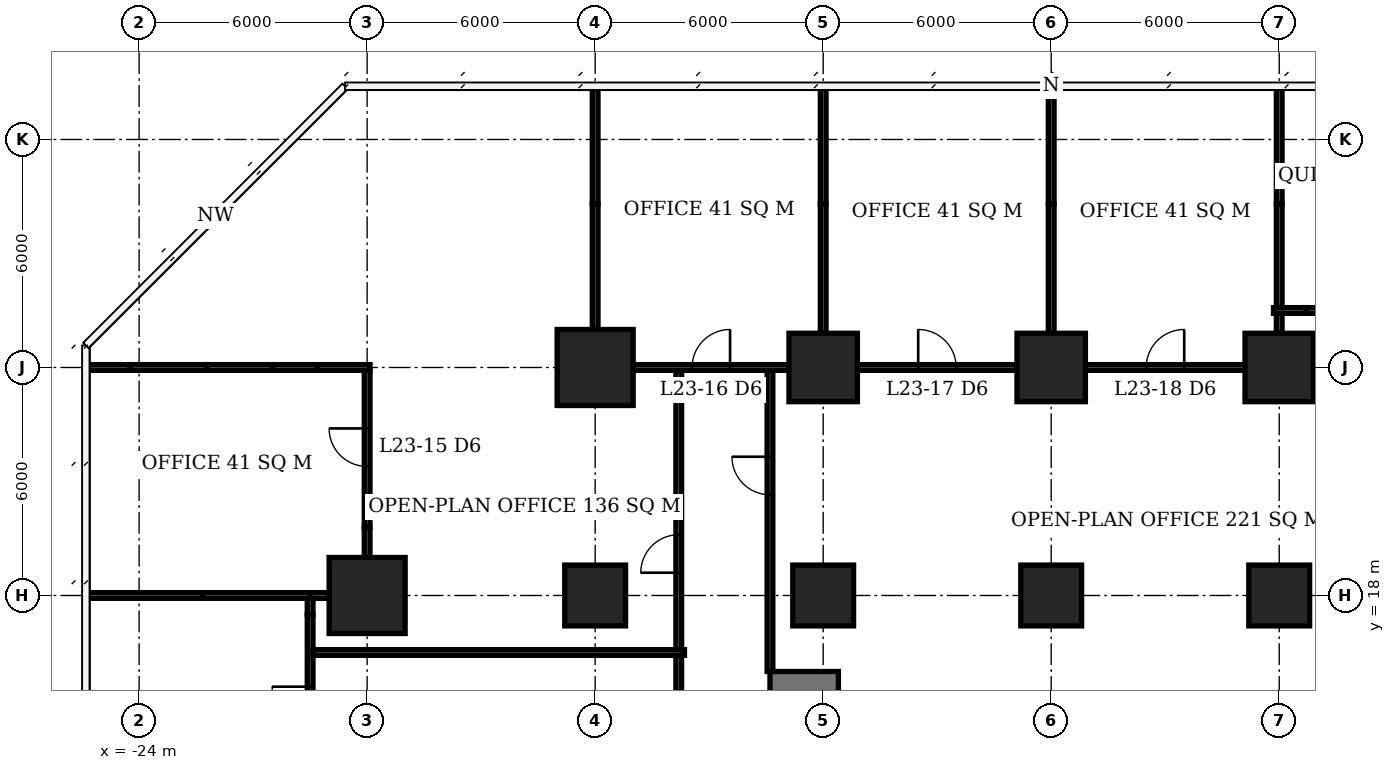
"""IFC4 building model, lengths in metres.
Left out: names, types, materials, properties, quantities, classifications, styles, units other than length and angle.
Written with IfcOpenShell. Run it as: python <this file> out.ifc"""

import sys

from ifc_helpers import new_model, si_unit, direction, frame, frame_2d, origin, origin_2d, place, context, subcontext, project, spatial, rectangle, extrude, element, fill, save


model = new_model("IFC4")
c1 = context("Model", 3, precision=1e-05, world=origin(), true_north=direction((0.0, 1.0)))
c2 = subcontext(c1, "Body", "Model", "MODEL_VIEW")
j1 = project(units=[si_unit("LENGTHUNIT", "METRE"), si_unit("PLANEANGLEUNIT", "RADIAN")], contexts=[c1])
p1 = place(None, origin())
s1 = spatial("IfcSite", under=j1, at=p1, CompositionType="ELEMENT")
p2 = place(p1, origin())
s2 = spatial("IfcBuilding", under=s1, at=p2, CompositionType="ELEMENT")
p3 = place(p2, frame((0.0, 0.0, 97.7)))
s3 = spatial("IfcBuildingStorey", under=s2, at=p3, CompositionType="ELEMENT", Elevation=97.7)
p4 = place(p3, frame((-18.0, 18.0, 0.0), z_axis=(0.0, 0.0, 1.0), x_axis=(1.0, 0.0, 0.0)))
e1 = element("IfcColumn", 1, at=p4, inside=s3, PredefinedType="COLUMN", context=c2, shape_type="SweptSolid", body=[
    extrude(rectangle(XDim=2.0, YDim=2.0, at=origin_2d()), origin(), (0.0, 0.0, 1.0), 3.9),
])
p5 = place(p3, frame((-12.0, 18.0, 0.0), z_axis=(0.0, 0.0, 1.0), x_axis=(1.0, 0.0, 0.0)))
e2 = element("IfcColumn", 2, at=p5, inside=s3, PredefinedType="COLUMN", context=c2, shape_type="SweptSolid", body=[
    extrude(rectangle(XDim=1.6, YDim=1.6, at=origin_2d()), origin(), (0.0, 0.0, 1.0), 3.9),
])
p6 = place(p3, frame((-12.0, 24.0, 0.0), z_axis=(0.0, 0.0, 1.0), x_axis=(1.0, 0.0, 0.0)))
e3 = element("IfcColumn", 3, at=p6, inside=s3, PredefinedType="COLUMN", context=c2, shape_type="SweptSolid", body=[
    extrude(rectangle(XDim=2.0, YDim=2.0, at=origin_2d()), origin(), (0.0, 0.0, 1.0), 3.9),
])
p7 = place(p3, frame((-6.0, 18.0, 0.0), z_axis=(0.0, 0.0, 1.0), x_axis=(1.0, 0.0, 0.0)))
e4 = element("IfcColumn", 4, at=p7, inside=s3, PredefinedType="COLUMN", context=c2, shape_type="SweptSolid", body=[
    extrude(rectangle(XDim=1.6, YDim=1.6, at=origin_2d()), origin(), (0.0, 0.0, 1.0), 3.9),
])
p8 = place(p3, frame((-6.0, 24.0, 0.0), z_axis=(0.0, 0.0, 1.0), x_axis=(1.0, 0.0, 0.0)))
e5 = element("IfcColumn", 5, at=p8, inside=s3, PredefinedType="COLUMN", context=c2, shape_type="SweptSolid", body=[
    extrude(rectangle(XDim=1.8, YDim=1.8, at=origin_2d()), origin(), (0.0, 0.0, 1.0), 3.9),
])
p9 = place(p3, frame((0.0, 18.0, 0.0), z_axis=(0.0, 0.0, 1.0), x_axis=(1.0, 0.0, 0.0)))
e6 = element("IfcColumn", 6, at=p9, inside=s3, PredefinedType="COLUMN", context=c2, shape_type="SweptSolid", body=[
    extrude(rectangle(XDim=1.6, YDim=1.6, at=origin_2d()), origin(), (0.0, 0.0, 1.0), 3.9),
])
p10 = place(p3, frame((0.0, 24.0, 0.0), z_axis=(0.0, 0.0, 1.0), x_axis=(1.0, 0.0, 0.0)))
e7 = element("IfcColumn", 7, at=p10, inside=s3, PredefinedType="COLUMN", context=c2, shape_type="SweptSolid", body=[
    extrude(rectangle(XDim=1.8, YDim=1.8, at=origin_2d()), origin(), (0.0, 0.0, 1.0), 3.9),
])
p11 = place(p3, frame((6.0, 18.0, 0.0), z_axis=(0.0, 0.0, 1.0), x_axis=(1.0, 0.0, 0.0)))
e8 = element("IfcColumn", 8, at=p11, inside=s3, PredefinedType="COLUMN", context=c2, shape_type="SweptSolid", body=[
    extrude(rectangle(XDim=1.6, YDim=1.6, at=origin_2d()), origin(), (0.0, 0.0, 1.0), 3.9),
])
p12 = place(p3, frame((6.0, 24.0, 0.0), z_axis=(0.0, 0.0, 1.0), x_axis=(1.0, 0.0, 0.0)))
e9 = element("IfcColumn", 9, at=p12, inside=s3, PredefinedType="COLUMN", context=c2, shape_type="SweptSolid", body=[
    extrude(rectangle(XDim=1.8, YDim=1.8, at=origin_2d()), origin(), (0.0, 0.0, 1.0), 3.9),
])
p13 = place(p3, frame((-6.5, 13.6, 0.0), z_axis=(0.0, 0.0, 1.0), x_axis=(0.0, 1.0, 0.0)))
e10 = element("IfcWall", 10, at=p13, inside=s3, PredefinedType="SHEAR", context=c2, shape_type="SweptSolid", body=[
    extrude(rectangle(XDim=2.4, YDim=1.8, at=frame_2d((1.2, 0.0))), origin(), (0.0, 0.0, 1.0), 3.9),
])
p14 = place(p3, frame((-25.4, 18.0, 0.0), z_axis=(0.0, 0.0, 1.0), x_axis=(1.0, 0.0, 0.0)))
e11 = element("IfcWall", 11, at=p14, inside=s3, PredefinedType="PARTITIONING", context=c2, shape_type="SweptSolid", body=[
    extrude(rectangle(XDim=3.09, YDim=0.15, at=frame_2d((1.545, 0.0))), origin(), (0.0, 0.0, 1.0), 3.65),
])
p15 = place(p3, frame((-22.31, 18.0, 0.0), z_axis=(0.0, 0.0, 1.0), x_axis=(1.0, 0.0, 0.0)))
e12 = element("IfcWall", 12, at=p15, inside=s3, PredefinedType="PARTITIONING", context=c2, shape_type="SweptSolid", body=[
    extrude(rectangle(XDim=2.885, YDim=0.15, at=frame_2d((1.442, 0.0))), origin(), (0.0, 0.0, 1.0), 2.65),
])
p16 = place(p3, frame((-19.5, 18.0, 0.0), z_axis=(0.0, 0.0, 1.0), x_axis=(1.0, 0.0, 0.0)))
e13 = element("IfcWall", 13, at=p16, inside=s3, PredefinedType="PARTITIONING", context=c2, shape_type="SweptSolid", body=[
    extrude(rectangle(XDim=0.5, YDim=0.15, at=frame_2d((0.25, 0.0))), origin(), (0.0, 0.0, 1.0), 2.65),
])
p17 = place(p3, frame((-25.4, 24.0, 0.0), z_axis=(0.0, 0.0, 1.0), x_axis=(1.0, 0.0, 0.0)))
e14 = element("IfcWall", 14, at=p17, inside=s3, PredefinedType="PARTITIONING", context=c2, shape_type="SweptSolid", body=[
    extrude(rectangle(XDim=1.163, YDim=0.15, at=frame_2d((0.582, 0.0))), origin(), (0.0, 0.0, 1.0), 3.65),
])
p18 = place(p3, frame((-24.237, 24.0, 0.0), z_axis=(0.0, 0.0, 1.0), x_axis=(1.0, 0.0, 0.0)))
e15 = element("IfcWall", 15, at=p18, inside=s3, PredefinedType="PARTITIONING", context=c2, shape_type="SweptSolid", body=[
    extrude(rectangle(XDim=2.029, YDim=0.15, at=frame_2d((1.015, 0.0))), origin(), (0.0, 0.0, 1.0), 2.65),
])
p19 = place(p3, frame((-22.208, 24.0, 0.0), z_axis=(0.0, 0.0, 1.0), x_axis=(1.0, 0.0, 0.0)))
e16 = element("IfcWall", 16, at=p19, inside=s3, PredefinedType="PARTITIONING", context=c2, shape_type="SweptSolid", body=[
    extrude(rectangle(XDim=1.718, YDim=0.15, at=frame_2d((0.859, 0.0))), origin(), (0.0, 0.0, 1.0), 3.65),
])
p20 = place(p3, frame((-20.49, 24.0, 0.0), z_axis=(0.0, 0.0, 1.0), x_axis=(1.0, 0.0, 0.0)))
e17 = element("IfcWall", 17, at=p20, inside=s3, PredefinedType="PARTITIONING", context=c2, shape_type="SweptSolid", body=[
    extrude(rectangle(XDim=1.18, YDim=0.15, at=frame_2d((0.59, 0.0))), origin(), (0.0, 0.0, 1.0), 2.65),
])
p21 = place(p3, frame((-19.31, 24.0, 0.0), z_axis=(0.0, 0.0, 1.0), x_axis=(1.0, 0.0, 0.0)))
e18 = element("IfcWall", 18, at=p21, inside=s3, PredefinedType="PARTITIONING", context=c2, shape_type="SweptSolid", body=[
    extrude(rectangle(XDim=1.385, YDim=0.15, at=frame_2d((0.692, 0.0))), origin(), (0.0, 0.0, 1.0), 3.65),
])
p22 = place(p3, frame((-11.0, 24.0, 0.0), z_axis=(0.0, 0.0, 1.0), x_axis=(1.0, 0.0, 0.0)))
e19 = element("IfcWall", 19, at=p22, inside=s3, PredefinedType="PARTITIONING", context=c2, shape_type="SweptSolid", body=[
    extrude(rectangle(XDim=4.1, YDim=0.15, at=frame_2d((2.05, 0.0))), origin(), (0.0, 0.0, 1.0), 3.65),
])
p23 = place(p22, frame((1.55, 0.0, 0.0)))
e20 = element("IfcOpeningElement", 20, at=p23, cuts=e19, PredefinedType="OPENING", context=c2, shape_type="SweptSolid", body=[
    extrude(rectangle(XDim=1.0, YDim=2.1, at=frame_2d((0.5, 1.05))), frame((0.0, 0.085, 0.0), z_axis=(0.0, -1.0, 0.0), x_axis=(1.0, 0.0, 0.0)), (0.0, 0.0, 1.0), 0.17),
])
p24 = place(p3, frame((-5.1, 24.0, 0.0), z_axis=(0.0, 0.0, 1.0), x_axis=(1.0, 0.0, 0.0)))
e21 = element("IfcWall", 21, at=p24, inside=s3, PredefinedType="PARTITIONING", context=c2, shape_type="SweptSolid", body=[
    extrude(rectangle(XDim=4.2, YDim=0.15, at=frame_2d((2.1, 0.0))), origin(), (0.0, 0.0, 1.0), 3.65),
])
p25 = place(p24, frame((1.6, 0.0, 0.0)))
e22 = element("IfcOpeningElement", 22, at=p25, cuts=e21, PredefinedType="OPENING", context=c2, shape_type="SweptSolid", body=[
    extrude(rectangle(XDim=1.0, YDim=2.1, at=frame_2d((0.5, 1.05))), frame((0.0, 0.085, 0.0), z_axis=(0.0, -1.0, 0.0), x_axis=(1.0, 0.0, 0.0)), (0.0, 0.0, 1.0), 0.17),
])
p26 = place(p3, frame((0.9, 24.0, 0.0), z_axis=(0.0, 0.0, 1.0), x_axis=(1.0, 0.0, 0.0)))
e23 = element("IfcWall", 23, at=p26, inside=s3, PredefinedType="PARTITIONING", context=c2, shape_type="SweptSolid", body=[
    extrude(rectangle(XDim=4.2, YDim=0.15, at=frame_2d((2.1, 0.0))), origin(), (0.0, 0.0, 1.0), 3.65),
])
p27 = place(p26, frame((1.6, 0.0, 0.0)))
e24 = element("IfcOpeningElement", 24, at=p27, cuts=e23, PredefinedType="OPENING", context=c2, shape_type="SweptSolid", body=[
    extrude(rectangle(XDim=1.0, YDim=2.1, at=frame_2d((0.5, 1.05))), frame((0.0, 0.085, 0.0), z_axis=(0.0, -1.0, 0.0), x_axis=(1.0, 0.0, 0.0)), (0.0, 0.0, 1.0), 0.17),
])
p28 = place(p3, frame((5.85, 25.5, 0.0), z_axis=(0.0, 0.0, 1.0), x_axis=(1.0, 0.0, 0.0)))
e25 = element("IfcWall", 25, at=p28, inside=s3, PredefinedType="PARTITIONING", context=c2, shape_type="SweptSolid", body=[
    extrude(rectangle(XDim=0.86, YDim=0.15, at=frame_2d((0.43, 0.0))), origin(), (0.0, 0.0, 1.0), 2.65),
])
p29 = place(p3, frame((6.71, 25.5, 0.0), z_axis=(0.0, 0.0, 1.0), x_axis=(1.0, 0.0, 0.0)))
e26 = element("IfcWall", 26, at=p29, inside=s3, PredefinedType="PARTITIONING", context=c2, shape_type="SweptSolid", body=[
    extrude(rectangle(XDim=4.58, YDim=0.15, at=frame_2d((2.29, 0.0))), origin(), (0.0, 0.0, 1.0), 3.65),
])
p30 = place(p29, frame((1.79, 0.0, 0.0)))
e27 = element("IfcOpeningElement", 27, at=p30, cuts=e26, PredefinedType="OPENING", context=c2, shape_type="SweptSolid", body=[
    extrude(rectangle(XDim=1.0, YDim=2.1, at=frame_2d((0.5, 1.05))), frame((0.0, 0.085, 0.0), z_axis=(0.0, -1.0, 0.0), x_axis=(1.0, 0.0, 0.0)), (0.0, 0.0, 1.0), 0.17),
])
p31 = place(p3, frame((-19.5, 12.71, 0.0), z_axis=(0.0, 0.0, 1.0), x_axis=(0.0, 1.0, 0.0)))
e28 = element("IfcWall", 28, at=p31, inside=s3, PredefinedType="PARTITIONING", context=c2, shape_type="SweptSolid", body=[
    extrude(rectangle(XDim=4.78, YDim=0.15, at=frame_2d((2.39, 0.0))), origin(), (0.0, 0.0, 1.0), 3.65),
])
p32 = place(p31, frame((1.89, 0.0, 0.0)))
e29 = element("IfcOpeningElement", 29, at=p32, cuts=e28, PredefinedType="OPENING", context=c2, shape_type="SweptSolid", body=[
    extrude(rectangle(XDim=1.0, YDim=2.1, at=frame_2d((0.5, 1.05))), frame((0.0, 0.085, 0.0), z_axis=(0.0, -1.0, 0.0), x_axis=(1.0, 0.0, 0.0)), (0.0, 0.0, 1.0), 0.17),
])
p33 = place(p3, frame((-19.5, 17.49, 0.0), z_axis=(0.0, 0.0, 1.0), x_axis=(0.0, 1.0, 0.0)))
e30 = element("IfcWall", 30, at=p33, inside=s3, PredefinedType="PARTITIONING", context=c2, shape_type="SweptSolid", body=[
    extrude(rectangle(XDim=0.435, YDim=0.15, at=frame_2d((0.218, 0.0))), origin(), (0.0, 0.0, 1.0), 2.65),
])
p34 = place(p3, frame((-18.0, 19.0, 0.0), z_axis=(0.0, 0.0, 1.0), x_axis=(0.0, 1.0, 0.0)))
e31 = element("IfcWall", 31, at=p34, inside=s3, PredefinedType="PARTITIONING", context=c2, shape_type="SweptSolid", body=[
    extrude(rectangle(XDim=0.792, YDim=0.15, at=frame_2d((0.396, 0.0))), origin(), (0.0, 0.0, 1.0), 2.65),
])
p35 = place(p3, frame((-18.0, 19.792, 0.0), z_axis=(0.0, 0.0, 1.0), x_axis=(0.0, 1.0, 0.0)))
e32 = element("IfcWall", 32, at=p35, inside=s3, PredefinedType="PARTITIONING", context=c2, shape_type="SweptSolid", body=[
    extrude(rectangle(XDim=4.133, YDim=0.15, at=frame_2d((2.066, 0.0))), origin(), (0.0, 0.0, 1.0), 3.65),
])
p36 = place(p35, frame((1.604, 0.0, 0.0)))
e33 = element("IfcOpeningElement", 33, at=p36, cuts=e32, PredefinedType="OPENING", context=c2, shape_type="SweptSolid", body=[
    extrude(rectangle(XDim=1.0, YDim=2.1, at=frame_2d((0.5, 1.05))), frame((0.0, 0.085, 0.0), z_axis=(0.0, -1.0, 0.0), x_axis=(1.0, 0.0, 0.0)), (0.0, 0.0, 1.0), 0.17),
])
p37 = place(p3, frame((-12.0, 25.0, 0.0), z_axis=(0.0, 0.0, 1.0), x_axis=(0.0, 1.0, 0.0)))
e34 = element("IfcWall", 34, at=p37, inside=s3, PredefinedType="PARTITIONING", context=c2, shape_type="SweptSolid", body=[
    extrude(rectangle(XDim=3.31, YDim=0.15, at=frame_2d((1.655, 0.0))), origin(), (0.0, 0.0, 1.0), 2.65),
])
p38 = place(p3, frame((-12.0, 28.31, 0.0), z_axis=(0.0, 0.0, 1.0), x_axis=(0.0, 1.0, 0.0)))
e35 = element("IfcWall", 35, at=p38, inside=s3, PredefinedType="PARTITIONING", context=c2, shape_type="SweptSolid", body=[
    extrude(rectangle(XDim=3.09, YDim=0.15, at=frame_2d((1.545, 0.0))), origin(), (0.0, 0.0, 1.0), 3.65),
])
p39 = place(p3, frame((-6.0, 24.9, 0.0), z_axis=(0.0, 0.0, 1.0), x_axis=(0.0, 1.0, 0.0)))
e36 = element("IfcWall", 36, at=p39, inside=s3, PredefinedType="PARTITIONING", context=c2, shape_type="SweptSolid", body=[
    extrude(rectangle(XDim=3.41, YDim=0.15, at=frame_2d((1.705, 0.0))), origin(), (0.0, 0.0, 1.0), 2.65),
])
p40 = place(p3, frame((-6.0, 28.31, 0.0), z_axis=(0.0, 0.0, 1.0), x_axis=(0.0, 1.0, 0.0)))
e37 = element("IfcWall", 37, at=p40, inside=s3, PredefinedType="PARTITIONING", context=c2, shape_type="SweptSolid", body=[
    extrude(rectangle(XDim=3.09, YDim=0.15, at=frame_2d((1.545, 0.0))), origin(), (0.0, 0.0, 1.0), 3.65),
])
p41 = place(p3, frame((0.0, 24.9, 0.0), z_axis=(0.0, 0.0, 1.0), x_axis=(0.0, 1.0, 0.0)))
e38 = element("IfcWall", 38, at=p41, inside=s3, PredefinedType="PARTITIONING", context=c2, shape_type="SweptSolid", body=[
    extrude(rectangle(XDim=3.41, YDim=0.15, at=frame_2d((1.705, 0.0))), origin(), (0.0, 0.0, 1.0), 2.65),
])
p42 = place(p3, frame((0.0, 28.31, 0.0), z_axis=(0.0, 0.0, 1.0), x_axis=(0.0, 1.0, 0.0)))
e39 = element("IfcWall", 39, at=p42, inside=s3, PredefinedType="PARTITIONING", context=c2, shape_type="SweptSolid", body=[
    extrude(rectangle(XDim=3.04, YDim=0.15, at=frame_2d((1.52, 0.0))), origin(), (0.0, 0.0, 1.0), 3.65),
])
p43 = place(p3, frame((6.0, 24.9, 0.0), z_axis=(0.0, 0.0, 1.0), x_axis=(0.0, 1.0, 0.0)))
e40 = element("IfcWall", 40, at=p43, inside=s3, PredefinedType="PARTITIONING", context=c2, shape_type="SweptSolid", body=[
    extrude(rectangle(XDim=0.525, YDim=0.15, at=frame_2d((0.263, 0.0))), origin(), (0.0, 0.0, 1.0), 2.65),
])
p44 = place(p3, frame((6.0, 25.575, 0.0), z_axis=(0.0, 0.0, 1.0), x_axis=(0.0, 1.0, 0.0)))
e41 = element("IfcWall", 41, at=p44, inside=s3, PredefinedType="PARTITIONING", context=c2, shape_type="SweptSolid", body=[
    extrude(rectangle(XDim=2.735, YDim=0.15, at=frame_2d((1.368, 0.0))), origin(), (0.0, 0.0, 1.0), 2.65),
])
p45 = place(p3, frame((6.0, 28.31, 0.0), z_axis=(0.0, 0.0, 1.0), x_axis=(0.0, 1.0, 0.0)))
e42 = element("IfcWall", 42, at=p45, inside=s3, PredefinedType="PARTITIONING", context=c2, shape_type="SweptSolid", body=[
    extrude(rectangle(XDim=3.09, YDim=0.15, at=frame_2d((1.545, 0.0))), origin(), (0.0, 0.0, 1.0), 3.65),
])
p46 = place(p3, frame((-19.425, 16.5, 0.0), z_axis=(0.0, 0.0, 1.0), x_axis=(1.0, 0.0, 0.0)))
e43 = element("IfcWall", 43, at=p46, inside=s3, PredefinedType="PARTITIONING", context=c2, shape_type="SweptSolid", body=[
    extrude(rectangle(XDim=9.775, YDim=0.15, at=frame_2d((4.888, 0.0))), origin(), (0.0, 0.0, 1.0), 3.65),
])
p47 = place(p3, frame((-9.8, 4.575, 0.0), z_axis=(0.0, 0.0, 1.0), x_axis=(0.0, 1.0, 0.0)))
e44 = element("IfcWall", 44, at=p47, inside=s3, PredefinedType="PARTITIONING", context=c2, shape_type="SweptSolid", body=[
    extrude(rectangle(XDim=11.85, YDim=0.15, at=frame_2d((5.925, 0.0))), origin(), (0.0, 0.0, 1.0), 3.65),
])
p48 = place(p47, frame((3.625, 0.0, 0.0)))
e45 = element("IfcOpeningElement", 45, at=p48, cuts=e44, PredefinedType="OPENING", context=c2, shape_type="SweptSolid", body=[
    extrude(rectangle(XDim=1.0, YDim=2.1, at=frame_2d((0.5, 1.05))), frame((0.0, 0.085, 0.0), z_axis=(0.0, -1.0, 0.0), x_axis=(1.0, 0.0, 0.0)), (0.0, 0.0, 1.0), 0.17),
])
p49 = place(p3, frame((-9.8, 16.575, 0.0), z_axis=(0.0, 0.0, 1.0), x_axis=(0.0, 1.0, 0.0)))
e46 = element("IfcWall", 46, at=p49, inside=s3, PredefinedType="PARTITIONING", context=c2, shape_type="SweptSolid", body=[
    extrude(rectangle(XDim=7.35, YDim=0.15, at=frame_2d((3.675, 0.0))), origin(), (0.0, 0.0, 1.0), 3.65),
])
p50 = place(p49, frame((2.024, 0.0, 0.0)))
e47 = element("IfcOpeningElement", 47, at=p50, cuts=e46, PredefinedType="OPENING", context=c2, shape_type="SweptSolid", body=[
    extrude(rectangle(XDim=1.0, YDim=2.1, at=frame_2d((0.5, 1.05))), frame((0.0, 0.085, 0.0), z_axis=(0.0, -1.0, 0.0), x_axis=(1.0, 0.0, 0.0)), (0.0, 0.0, 1.0), 0.17),
])
p51 = place(p3, frame((-7.4, 16.0, 0.0), z_axis=(0.0, 0.0, 1.0), x_axis=(0.0, 1.0, 0.0)))
e48 = element("IfcWall", 48, at=p51, inside=s3, PredefinedType="PARTITIONING", context=c2, shape_type="SweptSolid", body=[
    extrude(rectangle(XDim=7.925, YDim=0.15, at=frame_2d((3.962, 0.0))), origin(), (0.0, 0.0, 1.0), 3.65),
])
p52 = place(p51, frame((4.651, 0.0, 0.0)))
e49 = element("IfcOpeningElement", 49, at=p52, cuts=e48, PredefinedType="OPENING", context=c2, shape_type="SweptSolid", body=[
    extrude(rectangle(XDim=1.0, YDim=2.1, at=frame_2d((0.5, 1.05))), frame((0.0, 0.085, 0.0), z_axis=(0.0, -1.0, 0.0), x_axis=(1.0, 0.0, 0.0)), (0.0, 0.0, 1.0), 0.17),
])
p53 = place(p32, origin())
e50 = element("IfcDoor", 50, at=p53, inside=s3, OperationType="SINGLE_SWING_RIGHT", PredefinedType="DOOR", context=c2, shape_type="SweptSolid", body=[
    extrude(rectangle(XDim=1.0, YDim=2.1, at=frame_2d((0.5, 1.05))), frame((0.0, 0.025, 0.0), z_axis=(0.0, -1.0, 0.0), x_axis=(1.0, 0.0, 0.0)), (0.0, 0.0, 1.0), 0.05),
])
fill(e29, e50)
p54 = place(p36, origin())
e51 = element("IfcDoor", 51, at=p54, inside=s3, OperationType="SINGLE_SWING_RIGHT", PredefinedType="DOOR", context=c2, shape_type="SweptSolid", body=[
    extrude(rectangle(XDim=1.0, YDim=2.1, at=frame_2d((0.5, 1.05))), frame((0.0, 0.025, 0.0), z_axis=(0.0, -1.0, 0.0), x_axis=(1.0, 0.0, 0.0)), (0.0, 0.0, 1.0), 0.05),
])
fill(e33, e51)
p55 = place(p23, origin())
e52 = element("IfcDoor", 52, at=p55, inside=s3, OperationType="SINGLE_SWING_RIGHT", PredefinedType="DOOR", context=c2, shape_type="SweptSolid", body=[
    extrude(rectangle(XDim=1.0, YDim=2.1, at=frame_2d((0.5, 1.05))), frame((0.0, 0.025, 0.0), z_axis=(0.0, -1.0, 0.0), x_axis=(1.0, 0.0, 0.0)), (0.0, 0.0, 1.0), 0.05),
])
fill(e20, e52)
p56 = place(p25, origin())
e53 = element("IfcDoor", 53, at=p56, inside=s3, OperationType="SINGLE_SWING_LEFT", PredefinedType="DOOR", context=c2, shape_type="SweptSolid", body=[
    extrude(rectangle(XDim=1.0, YDim=2.1, at=frame_2d((0.5, 1.05))), frame((0.0, 0.025, 0.0), z_axis=(0.0, -1.0, 0.0), x_axis=(1.0, 0.0, 0.0)), (0.0, 0.0, 1.0), 0.05),
])
fill(e22, e53)
p57 = place(p27, origin())
e54 = element("IfcDoor", 54, at=p57, inside=s3, OperationType="SINGLE_SWING_RIGHT", PredefinedType="DOOR", context=c2, shape_type="SweptSolid", body=[
    extrude(rectangle(XDim=1.0, YDim=2.1, at=frame_2d((0.5, 1.05))), frame((0.0, 0.025, 0.0), z_axis=(0.0, -1.0, 0.0), x_axis=(1.0, 0.0, 0.0)), (0.0, 0.0, 1.0), 0.05),
])
fill(e24, e54)
p58 = place(p52, origin())
e55 = element("IfcDoor", 55, at=p58, inside=s3, OperationType="SINGLE_SWING_RIGHT", PredefinedType="DOOR", context=c2, shape_type="SweptSolid", body=[
    extrude(rectangle(XDim=1.0, YDim=2.1, at=frame_2d((0.5, 1.05))), frame((0.0, 0.025, 0.0), z_axis=(0.0, -1.0, 0.0), x_axis=(1.0, 0.0, 0.0)), (0.0, 0.0, 1.0), 0.05),
])
fill(e49, e55)
p59 = place(p50, origin())
e56 = element("IfcDoor", 56, at=p59, inside=s3, OperationType="SINGLE_SWING_LEFT", PredefinedType="DOOR", context=c2, shape_type="SweptSolid", body=[
    extrude(rectangle(XDim=1.0, YDim=2.1, at=frame_2d((0.5, 1.05))), frame((0.0, 0.025, 0.0), z_axis=(0.0, -1.0, 0.0), x_axis=(1.0, 0.0, 0.0)), (0.0, 0.0, 1.0), 0.05),
])
fill(e47, e56)
save(model, sys.argv[1])
